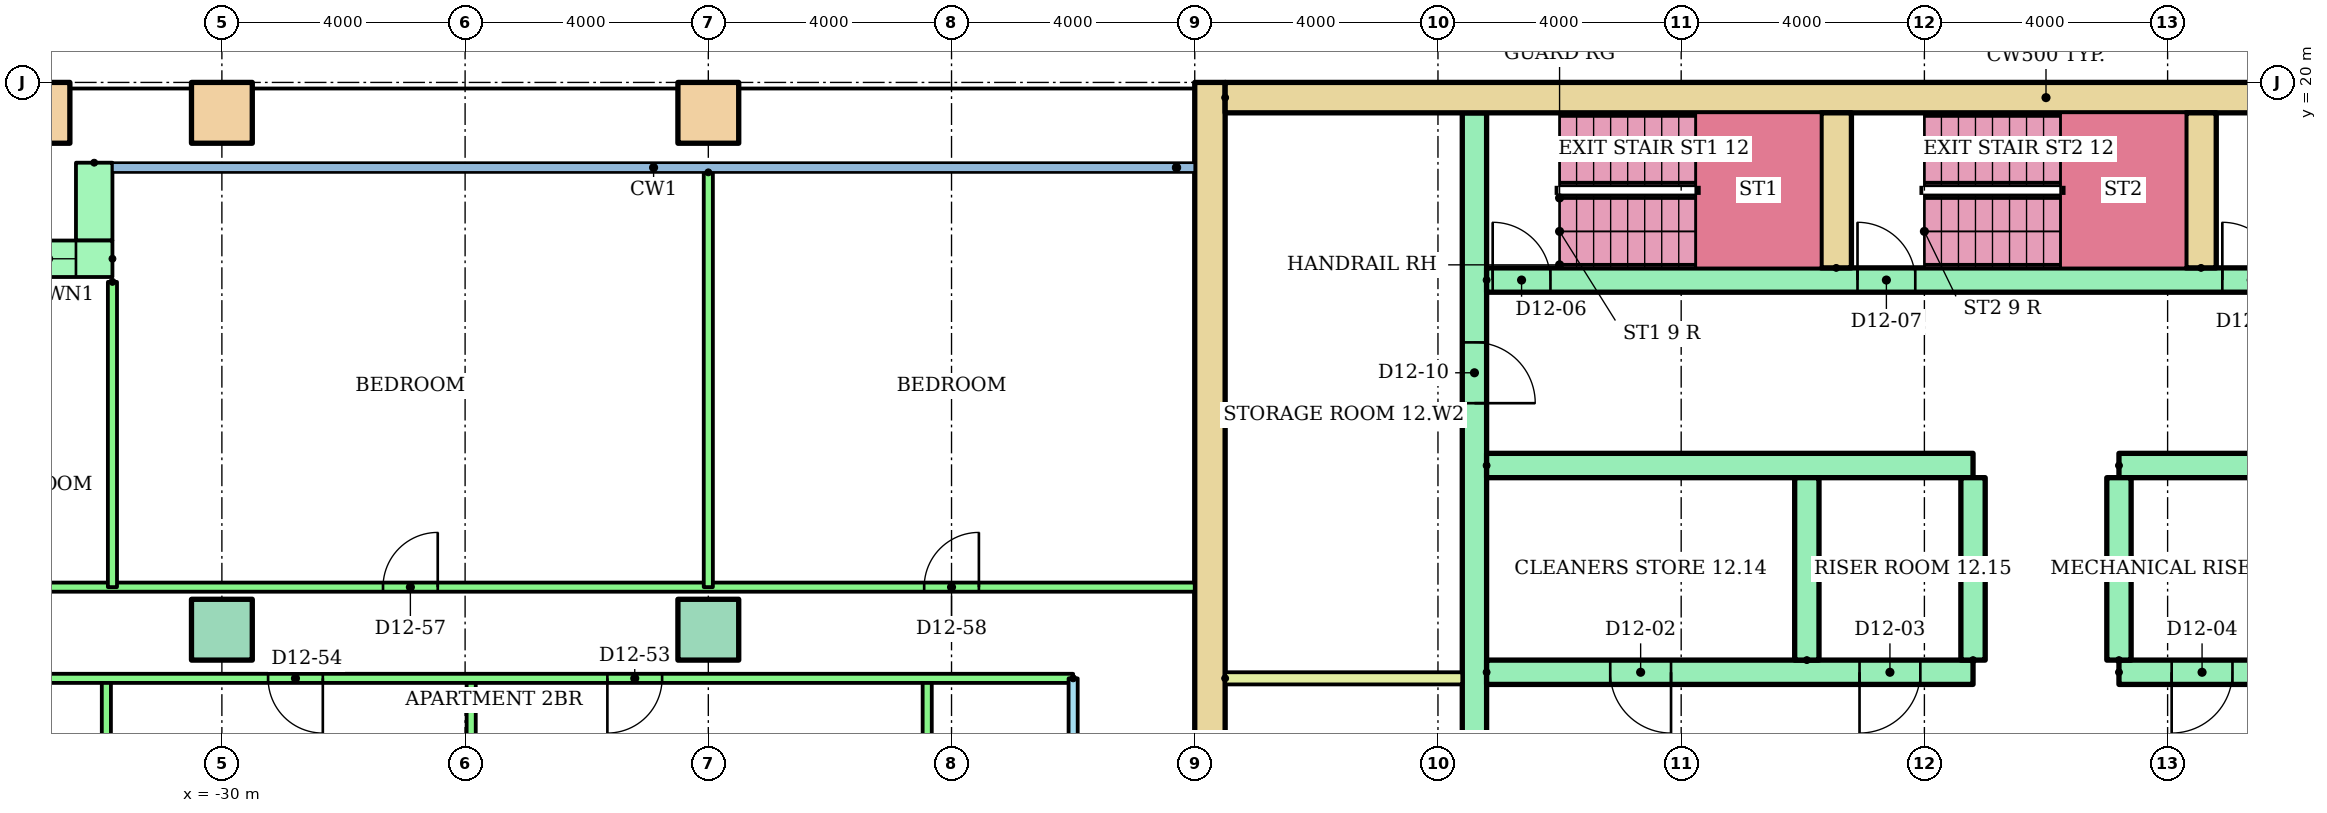
"""IFC4 building model, lengths in metres.
Left out: names, types, materials, properties, quantities, classifications, styles, units other than length and angle.
Written with IfcOpenShell. Run it as: python <this file> out.ifc"""

import sys

from ifc_helpers import new_model, si_unit, direction, frame, frame_2d, origin, origin_2d, place, context, subcontext, project, spatial, rectangle, hollow_rectangle, extrude, element, fill, save


model = new_model("IFC4")
c1 = context("Model", 3, precision=1e-05, world=origin(), true_north=direction((0.0, 1.0)))
c2 = subcontext(c1, "Body", "Model", "MODEL_VIEW")
j1 = project(units=[si_unit("LENGTHUNIT", "METRE"), si_unit("PLANEANGLEUNIT", "RADIAN")], contexts=[c1])
p1 = place(None, origin())
s1 = spatial("IfcSite", under=j1, at=p1, CompositionType="ELEMENT")
p2 = place(p1, origin())
s2 = spatial("IfcBuilding", under=s1, at=p2, CompositionType="ELEMENT")
p3 = place(p2, frame((0.0, 0.0, 48.0)))
s3 = spatial("IfcBuildingStorey", under=s2, at=p3, CompositionType="ELEMENT", Elevation=48.0)
for number, where in (
    (1, (-30.0, 11.0, 0.0)),
    (2, (-22.0, 11.0, 0.0)),
):
    element("IfcColumn", number, at=place(p3, frame(where)), inside=s3, PredefinedType="COLUMN", context=c2, shape_type="SweptSolid", body=[
        extrude(rectangle(XDim=1.0, YDim=1.0, at=origin_2d()), origin(), (0.0, 0.0, 1.0), 3.2),
    ])
for number, where in (
    (3, (-33.0, 19.5, 0.0)),
    (4, (-30.0, 19.5, 0.0)),
    (5, (-22.0, 19.5, 0.0)),
):
    element("IfcColumn", number, at=place(p3, frame(where)), inside=s3, PredefinedType="COLUMN", context=c2, shape_type="SweptSolid", body=[
        extrude(hollow_rectangle(XDim=1.0, YDim=1.0, WallThickness=0.05, at=origin_2d()), origin(), (0.0, 0.0, 1.0), 3.2),
    ])
p4 = place(p3, frame((-32.1, 18.68, 0.0), z_axis=(0.0, 0.0, 1.0), x_axis=(0.0, -1.0, 0.0)))
e6 = element("IfcWall", 6, at=p4, inside=s3, PredefinedType="STANDARD", context=c2, shape_type="SweptSolid", body=[
    extrude(rectangle(XDim=1.28, YDim=0.6, at=frame_2d((0.64, 0.0))), origin(), (0.0, 0.0, 1.0), 2.92),
])
p5 = place(p3, frame((-31.8, 17.1, 0.0), z_axis=(0.0, 0.0, 1.0), x_axis=(-1.0, 0.0, 0.0)))
e7 = element("IfcWall", 7, at=p5, inside=s3, PredefinedType="STANDARD", context=c2, shape_type="SweptSolid", body=[
    extrude(rectangle(XDim=2.1, YDim=0.6, at=frame_2d((1.05, 0.0))), origin(), (0.0, 0.0, 1.0), 2.92),
])
p6 = place(p5, frame((0.6, 0.0, 0.9)))
e8 = element("IfcOpeningElement", 8, at=p6, cuts=e7, PredefinedType="OPENING", context=c2, shape_type="SweptSolid", body=[
    extrude(rectangle(XDim=0.9, YDim=1.5, at=frame_2d((0.45, 0.75))), frame((0.0, 0.31, 0.0), z_axis=(0.0, -1.0, 0.0), x_axis=(1.0, 0.0, 0.0)), (0.0, 0.0, 1.0), 0.62),
])
p7 = place(p3, frame((-13.75, 3.0, 0.0), z_axis=(0.0, 0.0, 1.0), x_axis=(0.0, 1.0, 0.0)))
e9 = element("IfcWall", 9, at=p7, inside=s3, PredefinedType="SHEAR", context=c2, shape_type="SweptSolid", body=[
    extrude(rectangle(XDim=17.0, YDim=0.5, at=frame_2d((8.5, 0.0))), origin(), (0.0, 0.0, 1.0), 2.92),
])
p8 = place(p3, frame((-13.5, 19.75, 0.0)))
e10 = element("IfcWall", 10, at=p8, inside=s3, PredefinedType="SHEAR", context=c2, shape_type="SweptSolid", body=[
    extrude(rectangle(XDim=27.0, YDim=0.5, at=frame_2d((13.5, 0.0))), origin(), (0.0, 0.0, 1.0), 2.92),
])
p9 = place(p3, frame((-9.4, 6.8, 0.0), z_axis=(0.0, 0.0, 1.0), x_axis=(0.0, 1.0, 0.0)))
e11 = element("IfcWall", 11, at=p9, inside=s3, PredefinedType="SHEAR", context=c2, shape_type="SweptSolid", body=[
    extrude(rectangle(XDim=12.7, YDim=0.4, at=frame_2d((6.35, 0.0))), origin(), (0.0, 0.0, 1.0), 2.92),
])
p10 = place(p9, frame((1.15, 0.0, 0.0)))
e12 = element("IfcOpeningElement", 12, at=p10, cuts=e11, PredefinedType="OPENING", context=c2, shape_type="SweptSolid", body=[
    extrude(rectangle(XDim=1.0, YDim=2.1, at=frame_2d((0.5, 1.05))), frame((0.0, 0.21, 0.0), z_axis=(0.0, -1.0, 0.0), x_axis=(1.0, 0.0, 0.0)), (0.0, 0.0, 1.0), 0.42),
])
p11 = place(p9, frame((7.925, 0.0, 0.0)))
e13 = element("IfcOpeningElement", 13, at=p11, cuts=e11, PredefinedType="OPENING", context=c2, shape_type="SweptSolid", body=[
    extrude(rectangle(XDim=1.0, YDim=2.1, at=frame_2d((0.5, 1.05))), frame((0.0, 0.21, 0.0), z_axis=(0.0, -1.0, 0.0), x_axis=(1.0, 0.0, 0.0)), (0.0, 0.0, 1.0), 0.42),
])
p12 = place(p3, frame((-9.2, 10.3, 0.0)))
e14 = element("IfcWall", 14, at=p12, inside=s3, PredefinedType="SHEAR", context=c2, shape_type="SweptSolid", body=[
    extrude(rectangle(XDim=8.0, YDim=0.4, at=frame_2d((4.0, 0.0))), origin(), (0.0, 0.0, 1.0), 2.92),
])
p13 = place(p12, frame((2.033, 0.0, 0.0)))
e15 = element("IfcOpeningElement", 15, at=p13, cuts=e14, PredefinedType="OPENING", context=c2, shape_type="SweptSolid", body=[
    extrude(rectangle(XDim=1.0, YDim=2.1, at=frame_2d((0.5, 1.05))), frame((0.0, 0.21, 0.0), z_axis=(0.0, -1.0, 0.0), x_axis=(1.0, 0.0, 0.0)), (0.0, 0.0, 1.0), 0.42),
])
p14 = place(p12, frame((6.133, 0.0, 0.0)))
e16 = element("IfcOpeningElement", 16, at=p14, cuts=e14, PredefinedType="OPENING", context=c2, shape_type="SweptSolid", body=[
    extrude(rectangle(XDim=1.0, YDim=2.1, at=frame_2d((0.5, 1.05))), frame((0.0, 0.21, 0.0), z_axis=(0.0, -1.0, 0.0), x_axis=(1.0, 0.0, 0.0)), (0.0, 0.0, 1.0), 0.42),
])
p15 = place(p3, frame((-9.2, 13.7, 0.0)))
e17 = element("IfcWall", 17, at=p15, inside=s3, PredefinedType="SHEAR", context=c2, shape_type="SweptSolid", body=[
    extrude(rectangle(XDim=8.0, YDim=0.4, at=frame_2d((4.0, 0.0))), origin(), (0.0, 0.0, 1.0), 2.92),
])
p16 = place(p3, frame((1.2, 10.3, 0.0)))
e18 = element("IfcWall", 18, at=p16, inside=s3, PredefinedType="SHEAR", context=c2, shape_type="SweptSolid", body=[
    extrude(rectangle(XDim=8.0, YDim=0.4, at=frame_2d((4.0, 0.0))), origin(), (0.0, 0.0, 1.0), 2.92),
])
p17 = place(p16, frame((3.55, 0.0, 0.0)))
e19 = element("IfcOpeningElement", 19, at=p17, cuts=e18, PredefinedType="OPENING", context=c2, shape_type="SweptSolid", body=[
    extrude(rectangle(XDim=1.1, YDim=2.1, at=frame_2d((0.55, 1.05))), frame((0.0, 0.21, 0.0), z_axis=(0.0, -1.0, 0.0), x_axis=(1.0, 0.0, 0.0)), (0.0, 0.0, 1.0), 0.42),
])
p18 = place(p16, frame((6.283, 0.0, 0.0)))
e20 = element("IfcOpeningElement", 20, at=p18, cuts=e18, PredefinedType="OPENING", context=c2, shape_type="SweptSolid", body=[
    extrude(rectangle(XDim=1.1, YDim=2.1, at=frame_2d((0.55, 1.05))), frame((0.0, 0.21, 0.0), z_axis=(0.0, -1.0, 0.0), x_axis=(1.0, 0.0, 0.0)), (0.0, 0.0, 1.0), 0.42),
])
p19 = place(p16, frame((0.867, 0.0, 0.0)))
e21 = element("IfcOpeningElement", 21, at=p19, cuts=e18, PredefinedType="OPENING", context=c2, shape_type="SweptSolid", body=[
    extrude(rectangle(XDim=1.0, YDim=2.1, at=frame_2d((0.5, 1.05))), frame((0.0, 0.21, 0.0), z_axis=(0.0, -1.0, 0.0), x_axis=(1.0, 0.0, 0.0)), (0.0, 0.0, 1.0), 0.42),
])
p20 = place(p3, frame((1.2, 13.7, 0.0)))
e22 = element("IfcWall", 22, at=p20, inside=s3, PredefinedType="SHEAR", context=c2, shape_type="SweptSolid", body=[
    extrude(rectangle(XDim=8.0, YDim=0.4, at=frame_2d((4.0, 0.0))), origin(), (0.0, 0.0, 1.0), 2.92),
])
for number, where, z_axis, x_axis in (
    (23, (-3.933, 10.5, 0.0), (0.0, 0.0, 1.0), (0.0, 1.0, 0.0)),
    (24, (-1.2, 10.5, 0.0), (0.0, 0.0, 1.0), (0.0, 1.0, 0.0)),
    (25, (1.2, 10.5, 0.0), (0.0, 0.0, 1.0), (0.0, 1.0, 0.0)),
):
    element("IfcWall", number, at=place(p3, frame(where, z_axis=z_axis, x_axis=x_axis)), inside=s3, PredefinedType="SHEAR", context=c2, shape_type="SweptSolid", body=[
        extrude(rectangle(XDim=3.0, YDim=0.4, at=frame_2d((1.5, 0.0))), origin(), (0.0, 0.0, 1.0), 2.92),
    ])
p21 = place(p3, frame((-9.2, 16.75, 0.0)))
e26 = element("IfcWall", 26, at=p21, inside=s3, PredefinedType="SHEAR", context=c2, shape_type="SweptSolid", body=[
    extrude(rectangle(XDim=18.4, YDim=0.4, at=frame_2d((9.2, 0.0))), origin(), (0.0, 0.0, 1.0), 2.92),
])
p22 = place(p21, frame((0.1, 0.0, 0.0)))
e27 = element("IfcOpeningElement", 27, at=p22, cuts=e26, PredefinedType="OPENING", context=c2, shape_type="SweptSolid", body=[
    extrude(rectangle(XDim=0.95, YDim=2.1, at=frame_2d((0.475, 1.05))), frame((0.0, 0.21, 0.0), z_axis=(0.0, -1.0, 0.0), x_axis=(1.0, 0.0, 0.0)), (0.0, 0.0, 1.0), 0.42),
])
p23 = place(p21, frame((6.1, 0.0, 0.0)))
e28 = element("IfcOpeningElement", 28, at=p23, cuts=e26, PredefinedType="OPENING", context=c2, shape_type="SweptSolid", body=[
    extrude(rectangle(XDim=0.95, YDim=2.1, at=frame_2d((0.475, 1.05))), frame((0.0, 0.21, 0.0), z_axis=(0.0, -1.0, 0.0), x_axis=(1.0, 0.0, 0.0)), (0.0, 0.0, 1.0), 0.42),
])
p24 = place(p21, frame((12.1, 0.0, 0.0)))
e29 = element("IfcOpeningElement", 29, at=p24, cuts=e26, PredefinedType="OPENING", context=c2, shape_type="SweptSolid", body=[
    extrude(rectangle(XDim=0.95, YDim=2.1, at=frame_2d((0.475, 1.05))), frame((0.0, 0.21, 0.0), z_axis=(0.0, -1.0, 0.0), x_axis=(1.0, 0.0, 0.0)), (0.0, 0.0, 1.0), 0.42),
])
for number, where, z_axis, x_axis in (
    (30, (-3.45, 16.95, 0.0), (0.0, 0.0, 1.0), (0.0, 1.0, 0.0)),
    (31, (2.55, 16.95, 0.0), (0.0, 0.0, 1.0), (0.0, 1.0, 0.0)),
):
    element("IfcWall", number, at=place(p3, frame(where, z_axis=z_axis, x_axis=x_axis)), inside=s3, PredefinedType="SHEAR", context=c2, shape_type="SweptSolid", body=[
        extrude(rectangle(XDim=2.55, YDim=0.5, at=frame_2d((1.275, 0.0))), origin(), (0.0, 0.0, 1.0), 2.92),
    ])
p25 = place(p3, frame((-13.5, 10.2, 0.0)))
e32 = element("IfcWall", 32, at=p25, inside=s3, PredefinedType="PARTITIONING", context=c2, shape_type="SweptSolid", body=[
    extrude(rectangle(XDim=3.9, YDim=0.2, at=frame_2d((1.95, 0.0))), origin(), (0.0, 0.0, 1.0), 2.92),
])
p26 = place(p3, frame((-16.0, 1.4, 0.0), z_axis=(0.0, 0.0, 1.0), x_axis=(0.0, 1.0, 0.0)))
e33 = element("IfcWall", 33, at=p26, inside=s3, PredefinedType="PARTITIONING", context=c2, shape_type="SweptSolid", body=[
    extrude(rectangle(XDim=8.8, YDim=0.15, at=frame_2d((4.4, 0.0))), origin(), (0.0, 0.0, 1.0), 2.4),
])
p27 = place(p26, frame((1.925, 0.0, 0.0)))
e34 = element("IfcOpeningElement", 34, at=p27, cuts=e33, PredefinedType="OPENING", context=c2, shape_type="SweptSolid", body=[
    extrude(rectangle(XDim=0.9, YDim=2.1, at=frame_2d((0.45, 1.05))), frame((0.0, 0.085, 0.0), z_axis=(0.0, -1.0, 0.0), x_axis=(1.0, 0.0, 0.0)), (0.0, 0.0, 1.0), 0.17),
])
p28 = place(p26, frame((6.375, 0.0, 0.0)))
e35 = element("IfcOpeningElement", 35, at=p28, cuts=e33, PredefinedType="OPENING", context=c2, shape_type="SweptSolid", body=[
    extrude(rectangle(XDim=0.8, YDim=2.1, at=frame_2d((0.4, 1.05))), frame((0.0, 0.085, 0.0), z_axis=(0.0, -1.0, 0.0), x_axis=(1.0, 0.0, 0.0)), (0.0, 0.0, 1.0), 0.17),
])
for number, where, z_axis, x_axis in (
    (36, (-18.4, 1.4, 0.0), (0.0, 0.0, 1.0), (0.0, 1.0, 0.0)),
    (37, (-25.9, 1.4, 0.0), (0.0, 0.0, 1.0), (0.0, 1.0, 0.0)),
    (38, (-31.9, 1.4, 0.0), (0.0, 0.0, 1.0), (0.0, 1.0, 0.0)),
):
    element("IfcWall", number, at=place(p3, frame(where, z_axis=z_axis, x_axis=x_axis)), inside=s3, PredefinedType="PARTITIONING", context=c2, shape_type="SweptSolid", body=[
        extrude(rectangle(XDim=8.8, YDim=0.15, at=frame_2d((4.4, 0.0))), origin(), (0.0, 0.0, 1.0), 2.4),
    ])
p29 = place(p3, frame((-16.0, 10.2, 0.0), z_axis=(0.0, 0.0, 1.0), x_axis=(-1.0, 0.0, 0.0)))
e39 = element("IfcWall", 39, at=p29, inside=s3, PredefinedType="PARTITIONING", context=c2, shape_type="SweptSolid", body=[
    extrude(rectangle(XDim=20.52, YDim=0.15, at=frame_2d((10.26, 0.0))), origin(), (0.0, 0.0, 1.0), 2.4),
])
p30 = place(p29, frame((6.76, 0.0, 0.0)))
e40 = element("IfcOpeningElement", 40, at=p30, cuts=e39, PredefinedType="OPENING", context=c2, shape_type="SweptSolid", body=[
    extrude(rectangle(XDim=0.9, YDim=2.1, at=frame_2d((0.45, 1.05))), frame((0.0, 0.085, 0.0), z_axis=(0.0, -1.0, 0.0), x_axis=(1.0, 0.0, 0.0)), (0.0, 0.0, 1.0), 0.17),
])
p31 = place(p29, frame((12.34, 0.0, 0.0)))
e41 = element("IfcOpeningElement", 41, at=p31, cuts=e39, PredefinedType="OPENING", context=c2, shape_type="SweptSolid", body=[
    extrude(rectangle(XDim=0.9, YDim=2.1, at=frame_2d((0.45, 1.05))), frame((0.0, 0.085, 0.0), z_axis=(0.0, -1.0, 0.0), x_axis=(1.0, 0.0, 0.0)), (0.0, 0.0, 1.0), 0.17),
])
p32 = place(p29, frame((17.65, 0.0, 0.0)))
e42 = element("IfcOpeningElement", 42, at=p32, cuts=e39, PredefinedType="OPENING", context=c2, shape_type="SweptSolid", body=[
    extrude(rectangle(XDim=0.9, YDim=2.1, at=frame_2d((0.45, 1.05))), frame((0.0, 0.085, 0.0), z_axis=(0.0, -1.0, 0.0), x_axis=(1.0, 0.0, 0.0)), (0.0, 0.0, 1.0), 0.17),
])
p33 = place(p3, frame((-36.52, 11.7, 0.0)))
e43 = element("IfcWall", 43, at=p33, inside=s3, PredefinedType="PARTITIONING", context=c2, shape_type="SweptSolid", body=[
    extrude(rectangle(XDim=22.52, YDim=0.15, at=frame_2d((11.26, 0.0))), origin(), (0.0, 0.0, 1.0), 2.4),
])
p34 = place(p33, frame((1.97, 0.0, 0.0)))
e44 = element("IfcOpeningElement", 44, at=p34, cuts=e43, PredefinedType="OPENING", context=c2, shape_type="SweptSolid", body=[
    extrude(rectangle(XDim=1.0, YDim=2.1, at=frame_2d((0.5, 1.05))), frame((0.0, 0.085, 0.0), z_axis=(0.0, -1.0, 0.0), x_axis=(1.0, 0.0, 0.0)), (0.0, 0.0, 1.0), 0.17),
])
p35 = place(p33, frame((9.17, 0.0, 0.0)))
e45 = element("IfcOpeningElement", 45, at=p35, cuts=e43, PredefinedType="OPENING", context=c2, shape_type="SweptSolid", body=[
    extrude(rectangle(XDim=0.9, YDim=2.1, at=frame_2d((0.45, 1.05))), frame((0.0, 0.085, 0.0), z_axis=(0.0, -1.0, 0.0), x_axis=(1.0, 0.0, 0.0)), (0.0, 0.0, 1.0), 0.17),
])
p36 = place(p33, frame((18.07, 0.0, 0.0)))
e46 = element("IfcOpeningElement", 46, at=p36, cuts=e43, PredefinedType="OPENING", context=c2, shape_type="SweptSolid", body=[
    extrude(rectangle(XDim=0.9, YDim=2.1, at=frame_2d((0.45, 1.05))), frame((0.0, 0.085, 0.0), z_axis=(0.0, -1.0, 0.0), x_axis=(1.0, 0.0, 0.0)), (0.0, 0.0, 1.0), 0.17),
])
p37 = place(p3, frame((-31.8, 16.72, 0.0), z_axis=(0.0, 0.0, 1.0), x_axis=(0.0, -1.0, 0.0)))
e47 = element("IfcWall", 47, at=p37, inside=s3, PredefinedType="PARTITIONING", context=c2, shape_type="SweptSolid", body=[
    extrude(rectangle(XDim=5.02, YDim=0.15, at=frame_2d((2.51, 0.0))), origin(), (0.0, 0.0, 1.0), 2.4),
])
p38 = place(p3, frame((-22.0, 18.521, 0.0), z_axis=(0.0, 0.0, 1.0), x_axis=(0.0, -1.0, 0.0)))
e48 = element("IfcWall", 48, at=p38, inside=s3, PredefinedType="PARTITIONING", context=c2, shape_type="SweptSolid", body=[
    extrude(rectangle(XDim=6.821, YDim=0.15, at=frame_2d((3.411, 0.0))), origin(), (0.0, 0.0, 1.0), 2.4),
])
p39 = place(p6, origin())
e49 = element("IfcWindow", 49, at=p39, inside=s3, PartitioningType="SINGLE_PANEL", PredefinedType="WINDOW", context=c2, shape_type="SweptSolid", body=[
    extrude(rectangle(XDim=0.9, YDim=1.5, at=frame_2d((0.45, 0.75))), frame((0.0, 0.03, 0.0), z_axis=(0.0, -1.0, 0.0), x_axis=(1.0, 0.0, 0.0)), (0.0, 0.0, 1.0), 0.06),
])
fill(e8, e49)
p40 = place(p13, frame((1.0, 0.0, 0.0), z_axis=(0.0, 0.0, 1.0), x_axis=(-1.0, 0.0, 0.0)))
e50 = element("IfcDoor", 50, at=p40, inside=s3, OperationType="SINGLE_SWING_RIGHT", PredefinedType="DOOR", context=c2, shape_type="SweptSolid", body=[
    extrude(rectangle(XDim=1.0, YDim=2.1, at=frame_2d((0.5, 1.05))), frame((0.0, 0.025, 0.0), z_axis=(0.0, -1.0, 0.0), x_axis=(1.0, 0.0, 0.0)), (0.0, 0.0, 1.0), 0.05),
])
fill(e15, e50)
p41 = place(p14, frame((1.0, 0.0, 0.0), z_axis=(0.0, 0.0, 1.0), x_axis=(-1.0, 0.0, 0.0)))
e51 = element("IfcDoor", 51, at=p41, inside=s3, OperationType="SINGLE_SWING_LEFT", PredefinedType="DOOR", context=c2, shape_type="SweptSolid", body=[
    extrude(rectangle(XDim=1.0, YDim=2.1, at=frame_2d((0.5, 1.05))), frame((0.0, 0.025, 0.0), z_axis=(0.0, -1.0, 0.0), x_axis=(1.0, 0.0, 0.0)), (0.0, 0.0, 1.0), 0.05),
])
fill(e16, e51)
p42 = place(p19, frame((1.0, 0.0, 0.0), z_axis=(0.0, 0.0, 1.0), x_axis=(-1.0, 0.0, 0.0)))
e52 = element("IfcDoor", 52, at=p42, inside=s3, OperationType="SINGLE_SWING_LEFT", PredefinedType="DOOR", context=c2, shape_type="SweptSolid", body=[
    extrude(rectangle(XDim=1.0, YDim=2.1, at=frame_2d((0.5, 1.05))), frame((0.0, 0.025, 0.0), z_axis=(0.0, -1.0, 0.0), x_axis=(1.0, 0.0, 0.0)), (0.0, 0.0, 1.0), 0.05),
])
fill(e21, e52)
p43 = place(p22, origin())
e53 = element("IfcDoor", 53, at=p43, inside=s3, OperationType="SINGLE_SWING_LEFT", PredefinedType="DOOR", context=c2, shape_type="SweptSolid", body=[
    extrude(rectangle(XDim=0.95, YDim=2.1, at=frame_2d((0.475, 1.05))), frame((0.0, 0.025, 0.0), z_axis=(0.0, -1.0, 0.0), x_axis=(1.0, 0.0, 0.0)), (0.0, 0.0, 1.0), 0.05),
])
fill(e27, e53)
p44 = place(p23, origin())
e54 = element("IfcDoor", 54, at=p44, inside=s3, OperationType="SINGLE_SWING_LEFT", PredefinedType="DOOR", context=c2, shape_type="SweptSolid", body=[
    extrude(rectangle(XDim=0.95, YDim=2.1, at=frame_2d((0.475, 1.05))), frame((0.0, 0.025, 0.0), z_axis=(0.0, -1.0, 0.0), x_axis=(1.0, 0.0, 0.0)), (0.0, 0.0, 1.0), 0.05),
])
fill(e28, e54)
p45 = place(p24, origin())
e55 = element("IfcDoor", 55, at=p45, inside=s3, OperationType="SINGLE_SWING_LEFT", PredefinedType="DOOR", context=c2, shape_type="SweptSolid", body=[
    extrude(rectangle(XDim=0.95, YDim=2.1, at=frame_2d((0.475, 1.05))), frame((0.0, 0.025, 0.0), z_axis=(0.0, -1.0, 0.0), x_axis=(1.0, 0.0, 0.0)), (0.0, 0.0, 1.0), 0.05),
])
fill(e29, e55)
p46 = place(p11, frame((1.0, 0.0, 0.0), z_axis=(0.0, 0.0, 1.0), x_axis=(-1.0, 0.0, 0.0)))
e56 = element("IfcDoor", 56, at=p46, inside=s3, OperationType="SINGLE_SWING_LEFT", PredefinedType="DOOR", context=c2, shape_type="SweptSolid", body=[
    extrude(rectangle(XDim=1.0, YDim=2.1, at=frame_2d((0.5, 1.05))), frame((0.0, 0.025, 0.0), z_axis=(0.0, -1.0, 0.0), x_axis=(1.0, 0.0, 0.0)), (0.0, 0.0, 1.0), 0.05),
])
fill(e13, e56)
p47 = place(p30, origin())
e57 = element("IfcDoor", 57, at=p47, inside=s3, OperationType="SINGLE_SWING_RIGHT", PredefinedType="DOOR", context=c2, shape_type="SweptSolid", body=[
    extrude(rectangle(XDim=0.9, YDim=2.1, at=frame_2d((0.45, 1.05))), frame((0.0, 0.025, 0.0), z_axis=(0.0, -1.0, 0.0), x_axis=(1.0, 0.0, 0.0)), (0.0, 0.0, 1.0), 0.05),
])
fill(e40, e57)
p48 = place(p31, origin())
e58 = element("IfcDoor", 58, at=p48, inside=s3, OperationType="SINGLE_SWING_LEFT", PredefinedType="DOOR", context=c2, shape_type="SweptSolid", body=[
    extrude(rectangle(XDim=0.9, YDim=2.1, at=frame_2d((0.45, 1.05))), frame((0.0, 0.025, 0.0), z_axis=(0.0, -1.0, 0.0), x_axis=(1.0, 0.0, 0.0)), (0.0, 0.0, 1.0), 0.05),
])
fill(e41, e58)
p49 = place(p35, origin())
e59 = element("IfcDoor", 59, at=p49, inside=s3, OperationType="SINGLE_SWING_RIGHT", PredefinedType="DOOR", context=c2, shape_type="SweptSolid", body=[
    extrude(rectangle(XDim=0.9, YDim=2.1, at=frame_2d((0.45, 1.05))), frame((0.0, 0.025, 0.0), z_axis=(0.0, -1.0, 0.0), x_axis=(1.0, 0.0, 0.0)), (0.0, 0.0, 1.0), 0.05),
])
fill(e45, e59)
p50 = place(p36, origin())
e60 = element("IfcDoor", 60, at=p50, inside=s3, OperationType="SINGLE_SWING_RIGHT", PredefinedType="DOOR", context=c2, shape_type="SweptSolid", body=[
    extrude(rectangle(XDim=0.9, YDim=2.1, at=frame_2d((0.45, 1.05))), frame((0.0, 0.025, 0.0), z_axis=(0.0, -1.0, 0.0), x_axis=(1.0, 0.0, 0.0)), (0.0, 0.0, 1.0), 0.05),
])
fill(e46, e60)
save(model, sys.argv[1])
